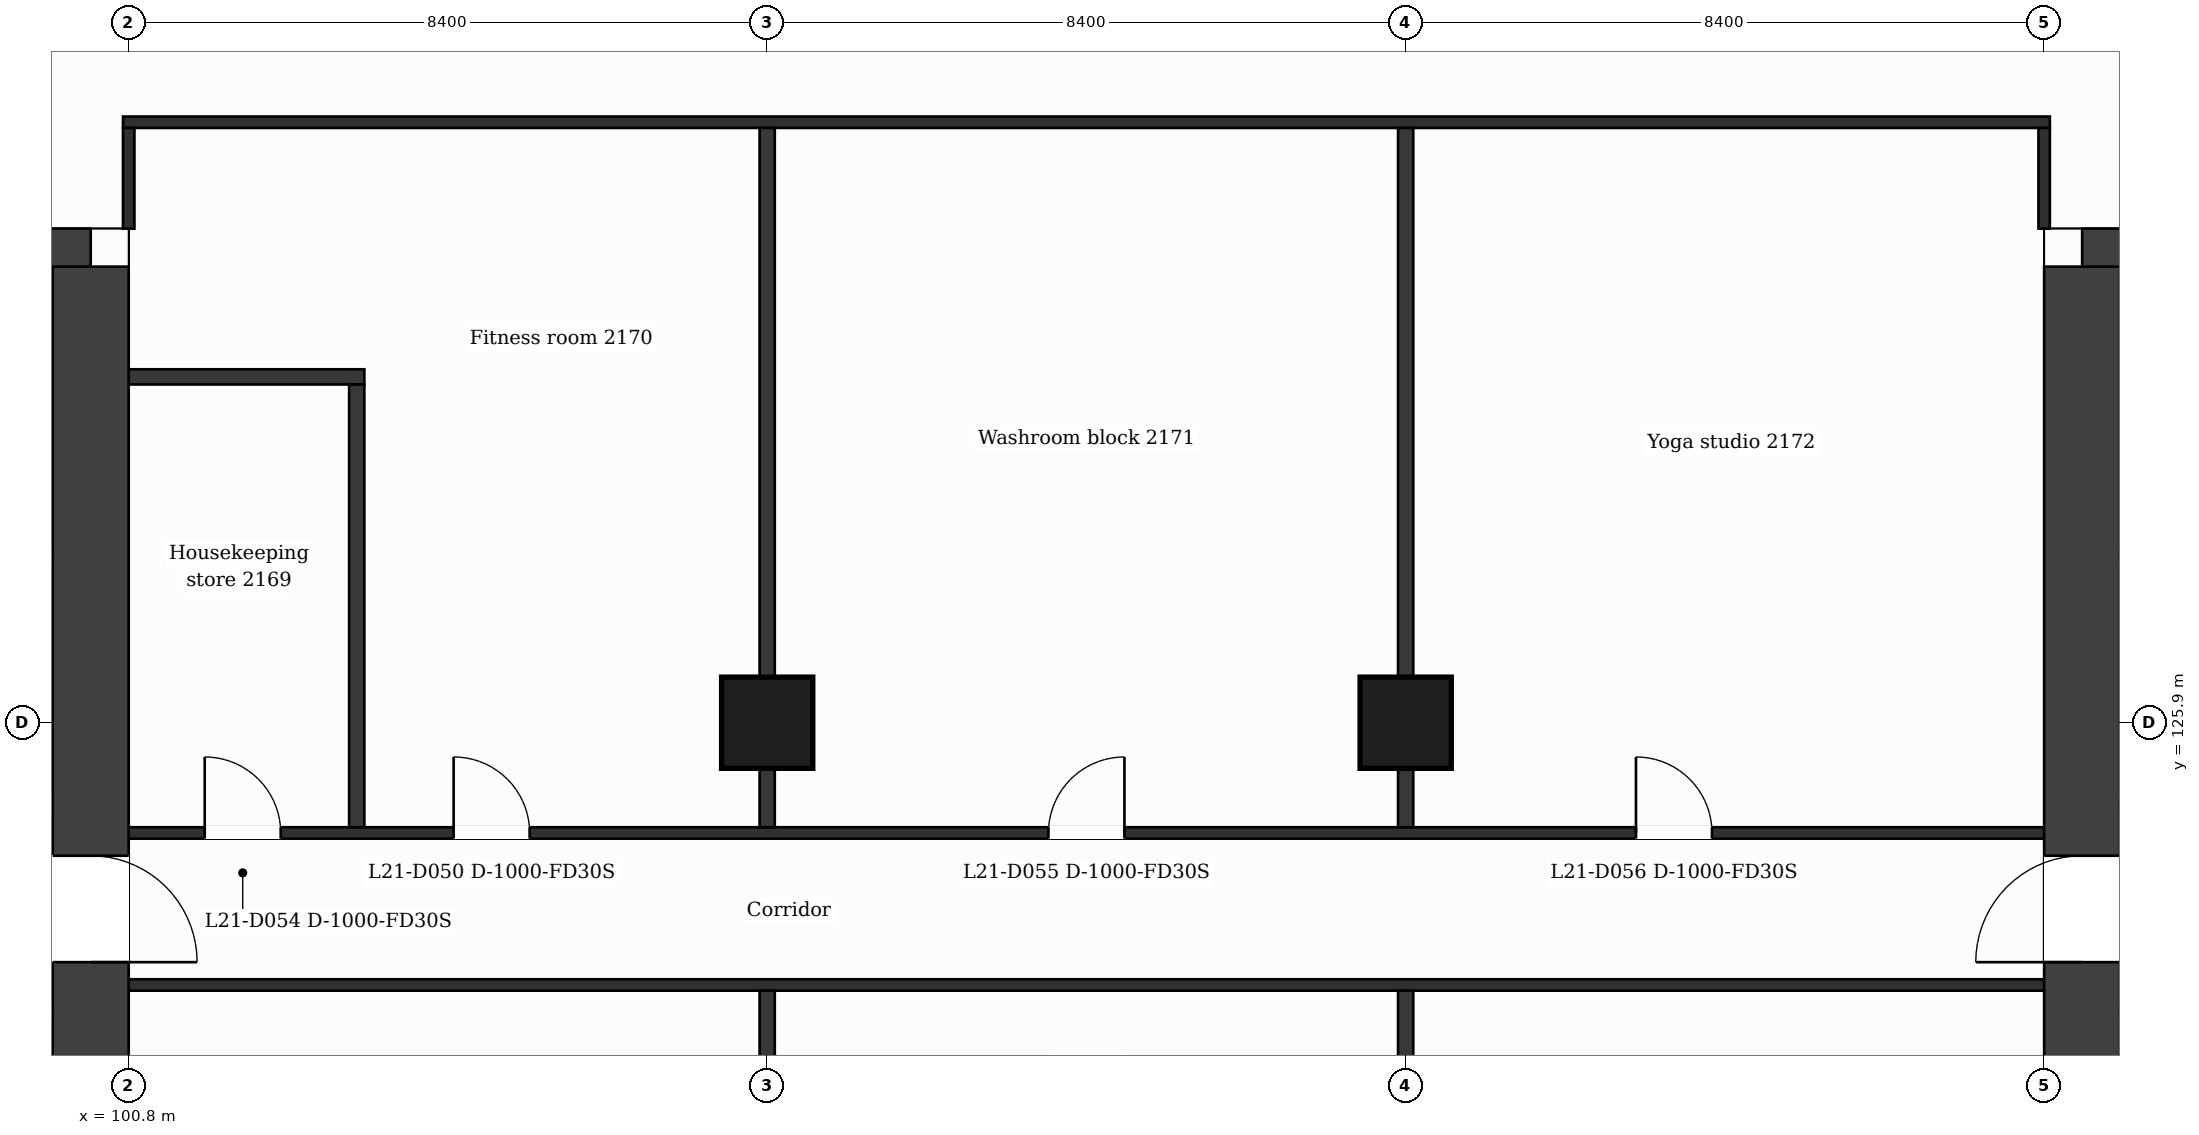
"""IFC4 building model, lengths in metres.
Left out: names, types, materials, properties, quantities, classifications, styles, units other than length and angle.
Written with IfcOpenShell. Run it as: python <this file> out.ifc"""

import sys

from ifc_helpers import new_model, si_unit, direction, frame, frame_2d, origin, origin_2d, place, context, subcontext, project, spatial, rectangle, extrude, element, fill, save


model = new_model("IFC4")
c1 = context("Model", 3, precision=1e-05, world=origin(), true_north=direction((0.0, 1.0)))
c2 = subcontext(c1, "Body", "Model", "MODEL_VIEW")
j1 = project(units=[si_unit("LENGTHUNIT", "METRE"), si_unit("PLANEANGLEUNIT", "RADIAN")], contexts=[c1])
p1 = place(None, origin())
s1 = spatial("IfcSite", under=j1, at=p1, CompositionType="ELEMENT")
p2 = place(p1, origin())
s2 = spatial("IfcBuilding", under=s1, at=p2, CompositionType="ELEMENT")
p3 = place(p2, frame((0.0, 0.0, 94.7)))
s3 = spatial("IfcBuildingStorey", under=s2, at=p3, CompositionType="ELEMENT", Elevation=94.7)
p4 = place(p3, frame((89.068, 131.9, 0.0), z_axis=(0.0, 0.0, 1.0), x_axis=(1.0, 0.0, 0.0)))
e1 = element("IfcWall", 1, at=p4, inside=s3, PredefinedType="SHEAR", context=c2, shape_type="SweptSolid", body=[
    extrude(rectangle(XDim=11.232, YDim=1.0, at=frame_2d((5.616, 0.0))), origin(), (0.0, 0.0, 1.0), 3.7),
])
p5 = place(p4, frame((6.646, 0.0, 0.0)))
e2 = element("IfcOpeningElement", 2, at=p5, cuts=e1, PredefinedType="OPENING", context=c2, shape_type="SweptSolid", body=[
    extrude(rectangle(XDim=1.2, YDim=2.1, at=frame_2d((0.6, 1.05))), frame((0.0, 0.51, 0.0), z_axis=(0.0, -1.0, 0.0), x_axis=(1.0, 0.0, 0.0)), (0.0, 0.0, 1.0), 1.02),
])
p6 = place(p3, frame((100.3, 131.9, 0.0), z_axis=(0.0, 0.0, 1.0), x_axis=(0.0, -1.0, 0.0)))
e3 = element("IfcWall", 3, at=p6, inside=s3, PredefinedType="SHEAR", context=c2, shape_type="SweptSolid", body=[
    extrude(rectangle(XDim=21.0, YDim=1.0, at=frame_2d((10.5, 0.0))), origin(), (0.0, 0.0, 1.0), 3.7),
])
p7 = place(p6, frame((7.75, 0.0, 0.0)))
e4 = element("IfcOpeningElement", 4, at=p7, cuts=e3, PredefinedType="OPENING", context=c2, shape_type="SweptSolid", body=[
    extrude(rectangle(XDim=1.4, YDim=2.1, at=frame_2d((0.7, 1.05))), frame((0.0, 0.51, 0.0), z_axis=(0.0, -1.0, 0.0), x_axis=(1.0, 0.0, 0.0)), (0.0, 0.0, 1.0), 1.02),
])
p8 = place(p3, frame((126.5, 131.9, 0.0), z_axis=(0.0, 0.0, 1.0), x_axis=(1.0, 0.0, 0.0)))
e5 = element("IfcWall", 5, at=p8, inside=s3, PredefinedType="SHEAR", context=c2, shape_type="SweptSolid", body=[
    extrude(rectangle(XDim=11.232, YDim=1.0, at=frame_2d((5.616, 0.0))), origin(), (0.0, 0.0, 1.0), 3.7),
])
p9 = place(p8, frame((3.386, 0.0, 0.0)))
e6 = element("IfcOpeningElement", 6, at=p9, cuts=e5, PredefinedType="OPENING", context=c2, shape_type="SweptSolid", body=[
    extrude(rectangle(XDim=1.2, YDim=2.1, at=frame_2d((0.6, 1.05))), frame((0.0, 0.51, 0.0), z_axis=(0.0, -1.0, 0.0), x_axis=(1.0, 0.0, 0.0)), (0.0, 0.0, 1.0), 1.02),
])
p10 = place(p3, frame((126.5, 110.9, 0.0), z_axis=(0.0, 0.0, 1.0), x_axis=(0.0, 1.0, 0.0)))
e7 = element("IfcWall", 7, at=p10, inside=s3, PredefinedType="SHEAR", context=c2, shape_type="SweptSolid", body=[
    extrude(rectangle(XDim=21.0, YDim=1.0, at=frame_2d((10.5, 0.0))), origin(), (0.0, 0.0, 1.0), 3.7),
])
p11 = place(p10, frame((11.85, 0.0, 0.0)))
e8 = element("IfcOpeningElement", 8, at=p11, cuts=e7, PredefinedType="OPENING", context=c2, shape_type="SweptSolid", body=[
    extrude(rectangle(XDim=1.4, YDim=2.1, at=frame_2d((0.7, 1.05))), frame((0.0, 0.51, 0.0), z_axis=(0.0, -1.0, 0.0), x_axis=(1.0, 0.0, 0.0)), (0.0, 0.0, 1.0), 1.02),
])
for number, where, z_axis, x_axis in (
    (9, (109.2, 125.9, 0.0), (0.0, 0.0, 1.0), (1.0, 0.0, 0.0)),
    (10, (117.6, 125.9, 0.0), (0.0, 0.0, 1.0), (1.0, 0.0, 0.0)),
):
    element("IfcColumn", number, at=place(p3, frame(where, z_axis=z_axis, x_axis=x_axis)), inside=s3, PredefinedType="COLUMN", context=c2, shape_type="SweptSolid", body=[
        extrude(rectangle(XDim=1.2, YDim=1.2, at=origin_2d()), origin(), (0.0, 0.0, 1.0), 3.7),
    ])
p12 = place(p3, frame((95.227, 122.1, 0.0), z_axis=(0.0, 0.0, 1.0), x_axis=(1.0, 0.0, 0.0)))
e11 = element("IfcWall", 11, at=p12, inside=s3, PredefinedType="PARTITIONING", context=c2, shape_type="SweptSolid", body=[
    extrude(rectangle(XDim=4.573, YDim=0.2, at=frame_2d((2.287, 0.0))), origin(), (0.0, 0.0, 1.0), 3.38),
])
p13 = place(p12, frame((0.522, 0.0, 0.0)))
e12 = element("IfcOpeningElement", 12, at=p13, cuts=e11, PredefinedType="OPENING", context=c2, shape_type="SweptSolid", body=[
    extrude(rectangle(XDim=0.9, YDim=2.1, at=frame_2d((0.45, 1.05))), frame((0.0, 0.11, 0.0), z_axis=(0.0, -1.0, 0.0), x_axis=(1.0, 0.0, 0.0)), (0.0, 0.0, 1.0), 0.22),
])
p14 = place(p12, frame((2.98, 0.0, 0.0)))
e13 = element("IfcOpeningElement", 13, at=p14, cuts=e11, PredefinedType="OPENING", context=c2, shape_type="SweptSolid", body=[
    extrude(rectangle(XDim=0.9, YDim=2.1, at=frame_2d((0.45, 1.05))), frame((0.0, 0.11, 0.0), z_axis=(0.0, -1.0, 0.0), x_axis=(1.0, 0.0, 0.0)), (0.0, 0.0, 1.0), 0.22),
])
p15 = place(p3, frame((100.8, 122.45, 0.0), z_axis=(0.0, 0.0, 1.0), x_axis=(1.0, 0.0, 0.0)))
e14 = element("IfcWall", 14, at=p15, inside=s3, PredefinedType="PARTITIONING", context=c2, shape_type="SweptSolid", body=[
    extrude(rectangle(XDim=25.2, YDim=0.15, at=frame_2d((12.6, 0.0))), origin(), (0.0, 0.0, 1.0), 3.38),
])
p16 = place(p3, frame((100.8, 124.45, 0.0), z_axis=(0.0, 0.0, 1.0), x_axis=(1.0, 0.0, 0.0)))
e15 = element("IfcWall", 15, at=p16, inside=s3, PredefinedType="PARTITIONING", context=c2, shape_type="SweptSolid", body=[
    extrude(rectangle(XDim=25.2, YDim=0.15, at=frame_2d((12.6, 0.0))), origin(), (0.0, 0.0, 1.0), 3.38),
])
p17 = place(p16, frame((4.275, 0.0, 0.0)))
e16 = element("IfcOpeningElement", 16, at=p17, cuts=e15, PredefinedType="OPENING", context=c2, shape_type="SweptSolid", body=[
    extrude(rectangle(XDim=1.0, YDim=2.1, at=frame_2d((0.5, 1.05))), frame((0.0, 0.085, 0.0), z_axis=(0.0, -1.0, 0.0), x_axis=(1.0, 0.0, 0.0)), (0.0, 0.0, 1.0), 0.17),
])
p18 = place(p16, frame((1.0, 0.0, 0.0)))
e17 = element("IfcOpeningElement", 17, at=p18, cuts=e15, PredefinedType="OPENING", context=c2, shape_type="SweptSolid", body=[
    extrude(rectangle(XDim=1.0, YDim=2.1, at=frame_2d((0.5, 1.05))), frame((0.0, 0.085, 0.0), z_axis=(0.0, -1.0, 0.0), x_axis=(1.0, 0.0, 0.0)), (0.0, 0.0, 1.0), 0.17),
])
p19 = place(p16, frame((12.1, 0.0, 0.0)))
e18 = element("IfcOpeningElement", 18, at=p19, cuts=e15, PredefinedType="OPENING", context=c2, shape_type="SweptSolid", body=[
    extrude(rectangle(XDim=1.0, YDim=2.1, at=frame_2d((0.5, 1.05))), frame((0.0, 0.085, 0.0), z_axis=(0.0, -1.0, 0.0), x_axis=(1.0, 0.0, 0.0)), (0.0, 0.0, 1.0), 0.17),
])
p20 = place(p16, frame((19.83, 0.0, 0.0)))
e19 = element("IfcOpeningElement", 19, at=p20, cuts=e15, PredefinedType="OPENING", context=c2, shape_type="SweptSolid", body=[
    extrude(rectangle(XDim=1.0, YDim=2.1, at=frame_2d((0.5, 1.05))), frame((0.0, 0.085, 0.0), z_axis=(0.0, -1.0, 0.0), x_axis=(1.0, 0.0, 0.0)), (0.0, 0.0, 1.0), 0.17),
])
p21 = place(p3, frame((127.0, 124.8, 0.0), z_axis=(0.0, 0.0, 1.0), x_axis=(1.0, 0.0, 0.0)))
e20 = element("IfcWall", 20, at=p21, inside=s3, PredefinedType="PARTITIONING", context=c2, shape_type="SweptSolid", body=[
    extrude(rectangle(XDim=4.649, YDim=0.2, at=frame_2d((2.324, 0.0))), origin(), (0.0, 0.0, 1.0), 3.38),
])
p22 = place(p21, frame((0.481, 0.0, 0.0)))
e21 = element("IfcOpeningElement", 21, at=p22, cuts=e20, PredefinedType="OPENING", context=c2, shape_type="SweptSolid", body=[
    extrude(rectangle(XDim=1.1, YDim=2.1, at=frame_2d((0.55, 1.05))), frame((0.0, 0.11, 0.0), z_axis=(0.0, -1.0, 0.0), x_axis=(1.0, 0.0, 0.0)), (0.0, 0.0, 1.0), 0.22),
])
p23 = place(p3, frame((127.0, 128.1, 0.0), z_axis=(0.0, 0.0, 1.0), x_axis=(1.0, 0.0, 0.0)))
e22 = element("IfcWall", 22, at=p23, inside=s3, PredefinedType="PARTITIONING", context=c2, shape_type="SweptSolid", body=[
    extrude(rectangle(XDim=4.649, YDim=0.2, at=frame_2d((2.324, 0.0))), origin(), (0.0, 0.0, 1.0), 3.38),
])
p24 = place(p23, frame((3.068, 0.0, 0.0)))
e23 = element("IfcOpeningElement", 23, at=p24, cuts=e22, PredefinedType="OPENING", context=c2, shape_type="SweptSolid", body=[
    extrude(rectangle(XDim=1.1, YDim=2.1, at=frame_2d((0.55, 1.05))), frame((0.0, 0.11, 0.0), z_axis=(0.0, -1.0, 0.0), x_axis=(1.0, 0.0, 0.0)), (0.0, 0.0, 1.0), 0.22),
])
p25 = place(p3, frame((100.8, 130.45, 0.0), z_axis=(0.0, 0.0, 1.0), x_axis=(1.0, 0.0, 0.0)))
e24 = element("IfcWall", 24, at=p25, inside=s3, PredefinedType="PARTITIONING", context=c2, shape_type="SweptSolid", body=[
    extrude(rectangle(XDim=3.1, YDim=0.2, at=frame_2d((1.55, 0.0))), origin(), (0.0, 0.0, 1.0), 3.38),
])
p26 = place(p3, frame((100.725, 133.8, 0.0), z_axis=(0.0, 0.0, 1.0), x_axis=(1.0, 0.0, 0.0)))
e25 = element("IfcWall", 25, at=p26, inside=s3, PredefinedType="PARTITIONING", context=c2, shape_type="SweptSolid", body=[
    extrude(rectangle(XDim=25.35, YDim=0.15, at=frame_2d((12.675, 0.0))), origin(), (0.0, 0.0, 1.0), 3.38),
])
p27 = place(p3, frame((100.8, 132.4, 0.0), z_axis=(0.0, 0.0, 1.0), x_axis=(0.0, 1.0, 0.0)))
e26 = element("IfcWall", 26, at=p27, inside=s3, PredefinedType="PARTITIONING", context=c2, shape_type="SweptSolid", body=[
    extrude(rectangle(XDim=1.325, YDim=0.15, at=frame_2d((0.663, 0.0))), origin(), (0.0, 0.0, 1.0), 3.38),
])
p28 = place(p3, frame((103.8, 124.525, 0.0), z_axis=(0.0, 0.0, 1.0), x_axis=(0.0, 1.0, 0.0)))
e27 = element("IfcWall", 27, at=p28, inside=s3, PredefinedType="PARTITIONING", context=c2, shape_type="SweptSolid", body=[
    extrude(rectangle(XDim=5.825, YDim=0.2, at=frame_2d((2.913, 0.0))), origin(), (0.0, 0.0, 1.0), 3.38),
])
p29 = place(p3, frame((109.2, 109.075, 0.0), z_axis=(0.0, 0.0, 1.0), x_axis=(0.0, 1.0, 0.0)))
e28 = element("IfcWall", 28, at=p29, inside=s3, PredefinedType="PARTITIONING", context=c2, shape_type="SweptSolid", body=[
    extrude(rectangle(XDim=13.3, YDim=0.2, at=frame_2d((6.65, 0.0))), origin(), (0.0, 0.0, 1.0), 3.38),
])
p30 = place(p3, frame((109.2, 124.525, 0.0), z_axis=(0.0, 0.0, 1.0), x_axis=(0.0, 1.0, 0.0)))
e29 = element("IfcWall", 29, at=p30, inside=s3, PredefinedType="PARTITIONING", context=c2, shape_type="SweptSolid", body=[
    extrude(rectangle(XDim=9.2, YDim=0.2, at=frame_2d((4.6, 0.0))), origin(), (0.0, 0.0, 1.0), 3.38),
])
p31 = place(p3, frame((117.6, 109.075, 0.0), z_axis=(0.0, 0.0, 1.0), x_axis=(0.0, 1.0, 0.0)))
e30 = element("IfcWall", 30, at=p31, inside=s3, PredefinedType="PARTITIONING", context=c2, shape_type="SweptSolid", body=[
    extrude(rectangle(XDim=13.3, YDim=0.2, at=frame_2d((6.65, 0.0))), origin(), (0.0, 0.0, 1.0), 3.38),
])
p32 = place(p3, frame((117.6, 124.525, 0.0), z_axis=(0.0, 0.0, 1.0), x_axis=(0.0, 1.0, 0.0)))
e31 = element("IfcWall", 31, at=p32, inside=s3, PredefinedType="PARTITIONING", context=c2, shape_type="SweptSolid", body=[
    extrude(rectangle(XDim=9.2, YDim=0.2, at=frame_2d((4.6, 0.0))), origin(), (0.0, 0.0, 1.0), 3.38),
])
p33 = place(p3, frame((126.0, 132.4, 0.0), z_axis=(0.0, 0.0, 1.0), x_axis=(0.0, 1.0, 0.0)))
e32 = element("IfcWall", 32, at=p33, inside=s3, PredefinedType="PARTITIONING", context=c2, shape_type="SweptSolid", body=[
    extrude(rectangle(XDim=1.325, YDim=0.15, at=frame_2d((0.663, 0.0))), origin(), (0.0, 0.0, 1.0), 3.38),
])
p34 = place(p17, origin())
e33 = element("IfcDoor", 33, at=p34, inside=s3, OperationType="SINGLE_SWING_LEFT", PredefinedType="DOOR", context=c2, shape_type="SweptSolid", body=[
    extrude(rectangle(XDim=1.0, YDim=2.1, at=frame_2d((0.5, 1.05))), frame((0.0, 0.025, 0.0), z_axis=(0.0, -1.0, 0.0), x_axis=(1.0, 0.0, 0.0)), (0.0, 0.0, 1.0), 0.05),
])
fill(e16, e33)
p35 = place(p18, origin())
e34 = element("IfcDoor", 34, at=p35, inside=s3, OperationType="SINGLE_SWING_LEFT", PredefinedType="DOOR", context=c2, shape_type="SweptSolid", body=[
    extrude(rectangle(XDim=1.0, YDim=2.1, at=frame_2d((0.5, 1.05))), frame((0.0, 0.025, 0.0), z_axis=(0.0, -1.0, 0.0), x_axis=(1.0, 0.0, 0.0)), (0.0, 0.0, 1.0), 0.05),
])
fill(e17, e34)
p36 = place(p19, origin())
e35 = element("IfcDoor", 35, at=p36, inside=s3, OperationType="SINGLE_SWING_RIGHT", PredefinedType="DOOR", context=c2, shape_type="SweptSolid", body=[
    extrude(rectangle(XDim=1.0, YDim=2.1, at=frame_2d((0.5, 1.05))), frame((0.0, 0.025, 0.0), z_axis=(0.0, -1.0, 0.0), x_axis=(1.0, 0.0, 0.0)), (0.0, 0.0, 1.0), 0.05),
])
fill(e18, e35)
p37 = place(p20, origin())
e36 = element("IfcDoor", 36, at=p37, inside=s3, OperationType="SINGLE_SWING_LEFT", PredefinedType="DOOR", context=c2, shape_type="SweptSolid", body=[
    extrude(rectangle(XDim=1.0, YDim=2.1, at=frame_2d((0.5, 1.05))), frame((0.0, 0.025, 0.0), z_axis=(0.0, -1.0, 0.0), x_axis=(1.0, 0.0, 0.0)), (0.0, 0.0, 1.0), 0.05),
])
fill(e19, e36)
p38 = place(p7, origin())
e37 = element("IfcDoor", 37, at=p38, inside=s3, OperationType="SINGLE_SWING_RIGHT", PredefinedType="DOOR", context=c2, shape_type="SweptSolid", body=[
    extrude(rectangle(XDim=1.4, YDim=2.1, at=frame_2d((0.7, 1.05))), frame((0.0, 0.025, 0.0), z_axis=(0.0, -1.0, 0.0), x_axis=(1.0, 0.0, 0.0)), (0.0, 0.0, 1.0), 0.05),
])
fill(e4, e37)
p39 = place(p11, origin())
e38 = element("IfcDoor", 38, at=p39, inside=s3, OperationType="SINGLE_SWING_LEFT", PredefinedType="DOOR", context=c2, shape_type="SweptSolid", body=[
    extrude(rectangle(XDim=1.4, YDim=2.1, at=frame_2d((0.7, 1.05))), frame((0.0, 0.025, 0.0), z_axis=(0.0, -1.0, 0.0), x_axis=(1.0, 0.0, 0.0)), (0.0, 0.0, 1.0), 0.05),
])
fill(e8, e38)
save(model, sys.argv[1])
